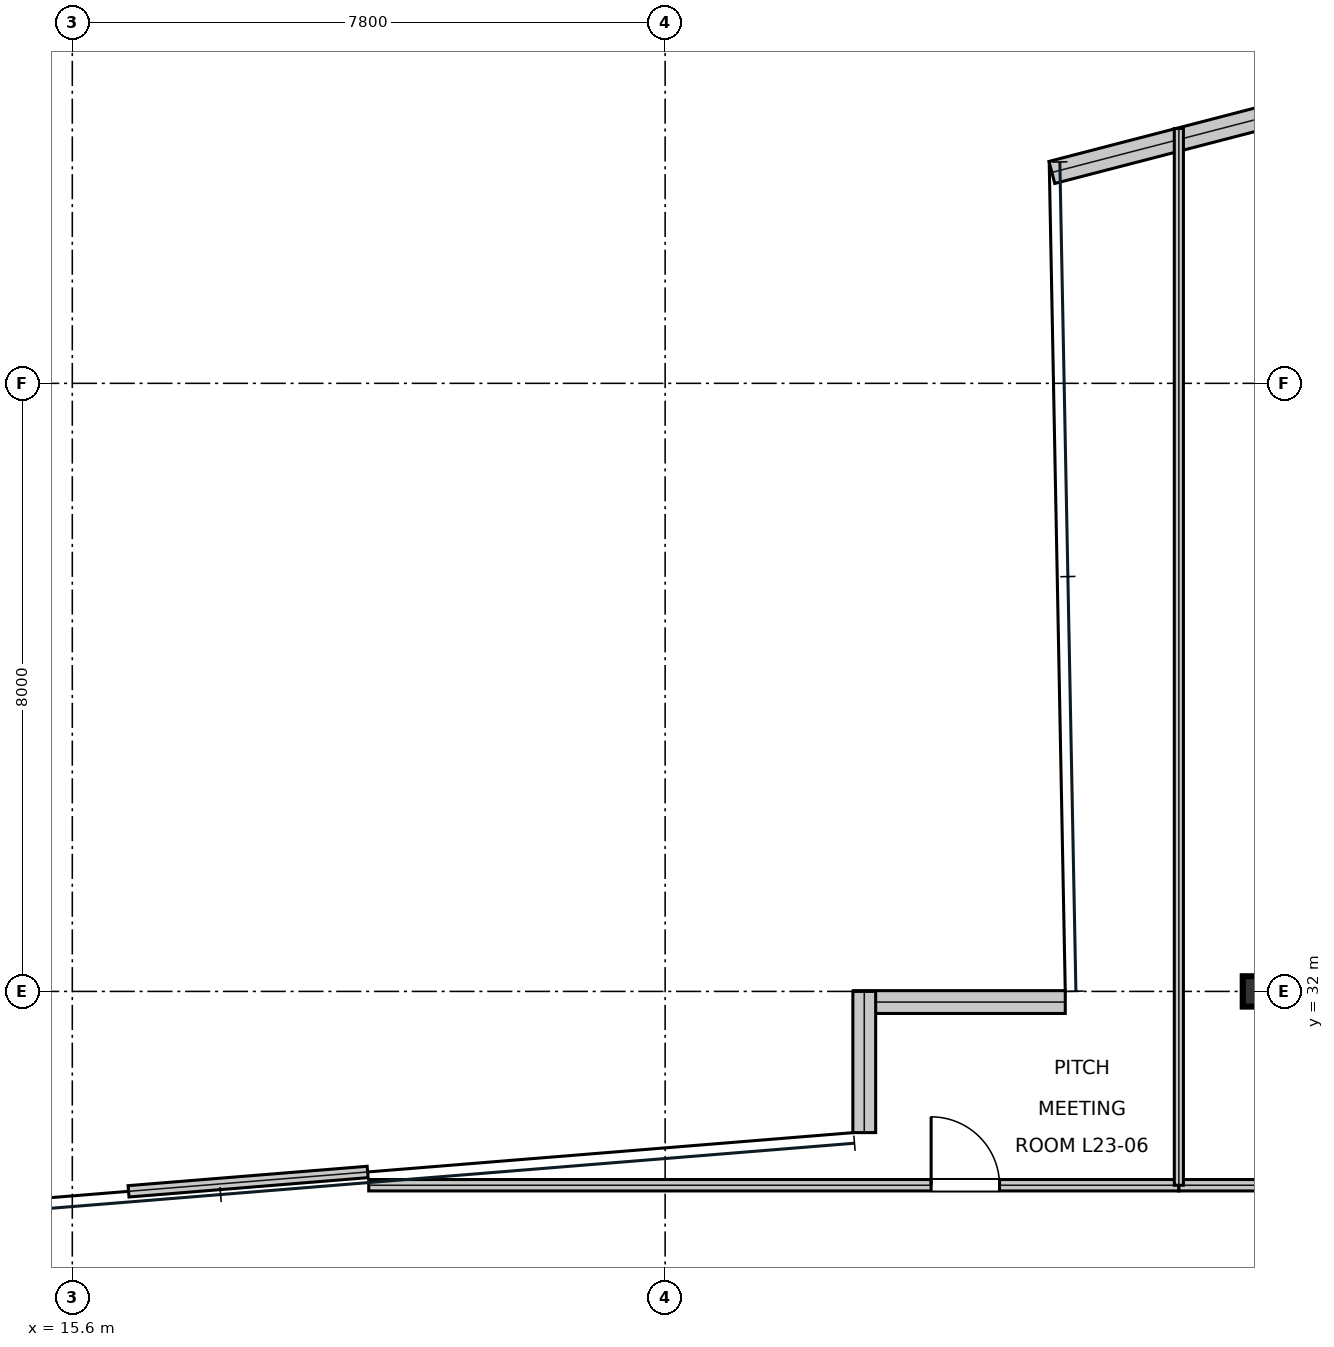
"""IFC4 building model, lengths in metres.
Left out: names, types, materials, properties, quantities, classifications, styles, units other than length and angle.
Written with IfcOpenShell. Run it as: python <this file> out.ifc"""

import sys

from ifc_helpers import new_model, si_unit, direction, frame, frame_2d, origin, origin_2d, place, context, subcontext, project, spatial, rectangle, i_section, extrude, element, fill, save


model = new_model("IFC4")
c1 = context("Model", 3, precision=1e-05, world=origin(), true_north=direction((0.0, 1.0)))
c2 = subcontext(c1, "Body", "Model", "MODEL_VIEW")
j1 = project(units=[si_unit("LENGTHUNIT", "METRE"), si_unit("PLANEANGLEUNIT", "RADIAN")], contexts=[c1])
p1 = place(None, origin())
s1 = spatial("IfcSite", under=j1, at=p1, CompositionType="ELEMENT")
p2 = place(p1, origin())
s2 = spatial("IfcBuilding", under=s1, at=p2, CompositionType="ELEMENT")
p3 = place(p2, frame((0.0, 0.0, 102.6)))
s3 = spatial("IfcBuildingStorey", under=s2, at=p3, CompositionType="ELEMENT", Elevation=102.6)
p4 = place(p3, frame((31.2, 32.0, 0.0), z_axis=(0.0, 0.0, 1.0), x_axis=(1.0, 0.0, 0.0)))
e1 = element("IfcColumn", 1, at=p4, inside=s3, PredefinedType="COLUMN", context=c2, shape_type="SweptSolid", body=[
    extrude(i_section(OverallWidth=0.401, OverallDepth=0.399, WebThickness=0.025, FlangeThickness=0.04, at=origin_2d()), origin(), (0.0, 0.0, 1.0), 4.044),
])
p5 = place(p3, frame((35.045, 44.475, 0.0), z_axis=(0.0, 0.0, 1.0), x_axis=(-0.967987493138, -0.250998432521, 0.0)))
e2 = element("IfcWall", 2, at=p5, inside=s3, PredefinedType="STANDARD", context=c2, shape_type="SweptSolid", body=[
    extrude(rectangle(XDim=6.774, YDim=0.3, at=frame_2d((3.387, 0.0))), origin(), (0.0, 0.0, 1.0), 3.73),
])
p6 = place(p3, frame((28.665, 31.86, 0.0), z_axis=(0.0, 0.0, 1.0), x_axis=(-1.0, 0.0, 0.0)))
e3 = element("IfcWall", 3, at=p6, inside=s3, PredefinedType="STANDARD", context=c2, shape_type="SweptSolid", body=[
    extrude(rectangle(XDim=2.785, YDim=0.3, at=frame_2d((1.392, 0.0))), origin(), (0.0, 0.0, 1.0), 3.73),
])
p7 = place(p3, frame((26.02, 32.0, 0.0), z_axis=(0.0, 0.0, 1.0), x_axis=(0.0, -1.0, 0.0)))
e4 = element("IfcWall", 4, at=p7, inside=s3, PredefinedType="STANDARD", context=c2, shape_type="SweptSolid", body=[
    extrude(rectangle(XDim=1.857, YDim=0.3, at=frame_2d((0.929, 0.0))), origin(), (0.0, 0.0, 1.0), 3.258),
])
p8 = place(p3, frame((19.5, 29.45, 0.0), z_axis=(0.0, 0.0, 1.0), x_axis=(1.0, 0.0, 0.0)))
e5 = element("IfcWall", 5, at=p8, inside=s3, PredefinedType="PARTITIONING", context=c2, shape_type="SweptSolid", body=[
    extrude(rectangle(XDim=10.659, YDim=0.15, at=frame_2d((5.33, 0.0))), origin(), (0.0, 0.0, 1.0), 3.258),
])
p9 = place(p8, frame((7.399, 0.0, 0.0)))
e6 = element("IfcOpeningElement", 6, at=p9, cuts=e5, PredefinedType="OPENING", context=c2, shape_type="SweptSolid", body=[
    extrude(rectangle(XDim=0.9, YDim=2.15, at=frame_2d((0.45, 1.075))), frame((0.0, 0.085, 0.0), z_axis=(0.0, -1.0, 0.0), x_axis=(1.0, 0.0, 0.0)), (0.0, 0.0, 1.0), 0.17),
])
p10 = place(p3, frame((16.34, 29.37, 0.0), z_axis=(0.0, 0.0, 1.0), x_axis=(0.99672786924, 0.080830406903, 0.0)))
e7 = element("IfcWall", 7, at=p10, inside=s3, PredefinedType="PARTITIONING", context=c2, shape_type="SweptSolid", body=[
    extrude(rectangle(XDim=3.156, YDim=0.15, at=frame_2d((1.578, 0.0))), origin(), (0.0, 0.0, 1.0), 3.73),
])
p11 = place(p3, frame((30.159, 29.45, 0.0), z_axis=(0.0, 0.0, 1.0), x_axis=(1.0, 0.0, 0.0)))
e8 = element("IfcWall", 8, at=p11, inside=s3, PredefinedType="PARTITIONING", context=c2, shape_type="SweptSolid", body=[
    extrude(rectangle(XDim=3.241, YDim=0.15, at=frame_2d((1.621, 0.0))), origin(), (0.0, 0.0, 1.0), 3.101),
])
p12 = place(p3, frame((30.159, 29.45, 0.0), z_axis=(0.0, 0.0, 1.0), x_axis=(0.0, 1.0, 0.0)))
e9 = element("IfcWall", 9, at=p12, inside=s3, PredefinedType="PARTITIONING", context=c2, shape_type="SweptSolid", body=[
    extrude(rectangle(XDim=13.902, YDim=0.12, at=frame_2d((6.951, 0.0))), origin(), (0.0, 0.0, 1.0), 3.258),
])
p13 = place(p9, origin())
e10 = element("IfcDoor", 10, at=p13, inside=s3, OperationType="SINGLE_SWING_LEFT", PredefinedType="DOOR", context=c2, shape_type="SweptSolid", body=[
    extrude(rectangle(XDim=0.9, YDim=2.15, at=frame_2d((0.45, 1.075))), frame((0.0, 0.025, 0.0), z_axis=(0.0, -1.0, 0.0), x_axis=(1.0, 0.0, 0.0)), (0.0, 0.0, 1.0), 0.05),
])
fill(e6, e10)
save(model, sys.argv[1])
